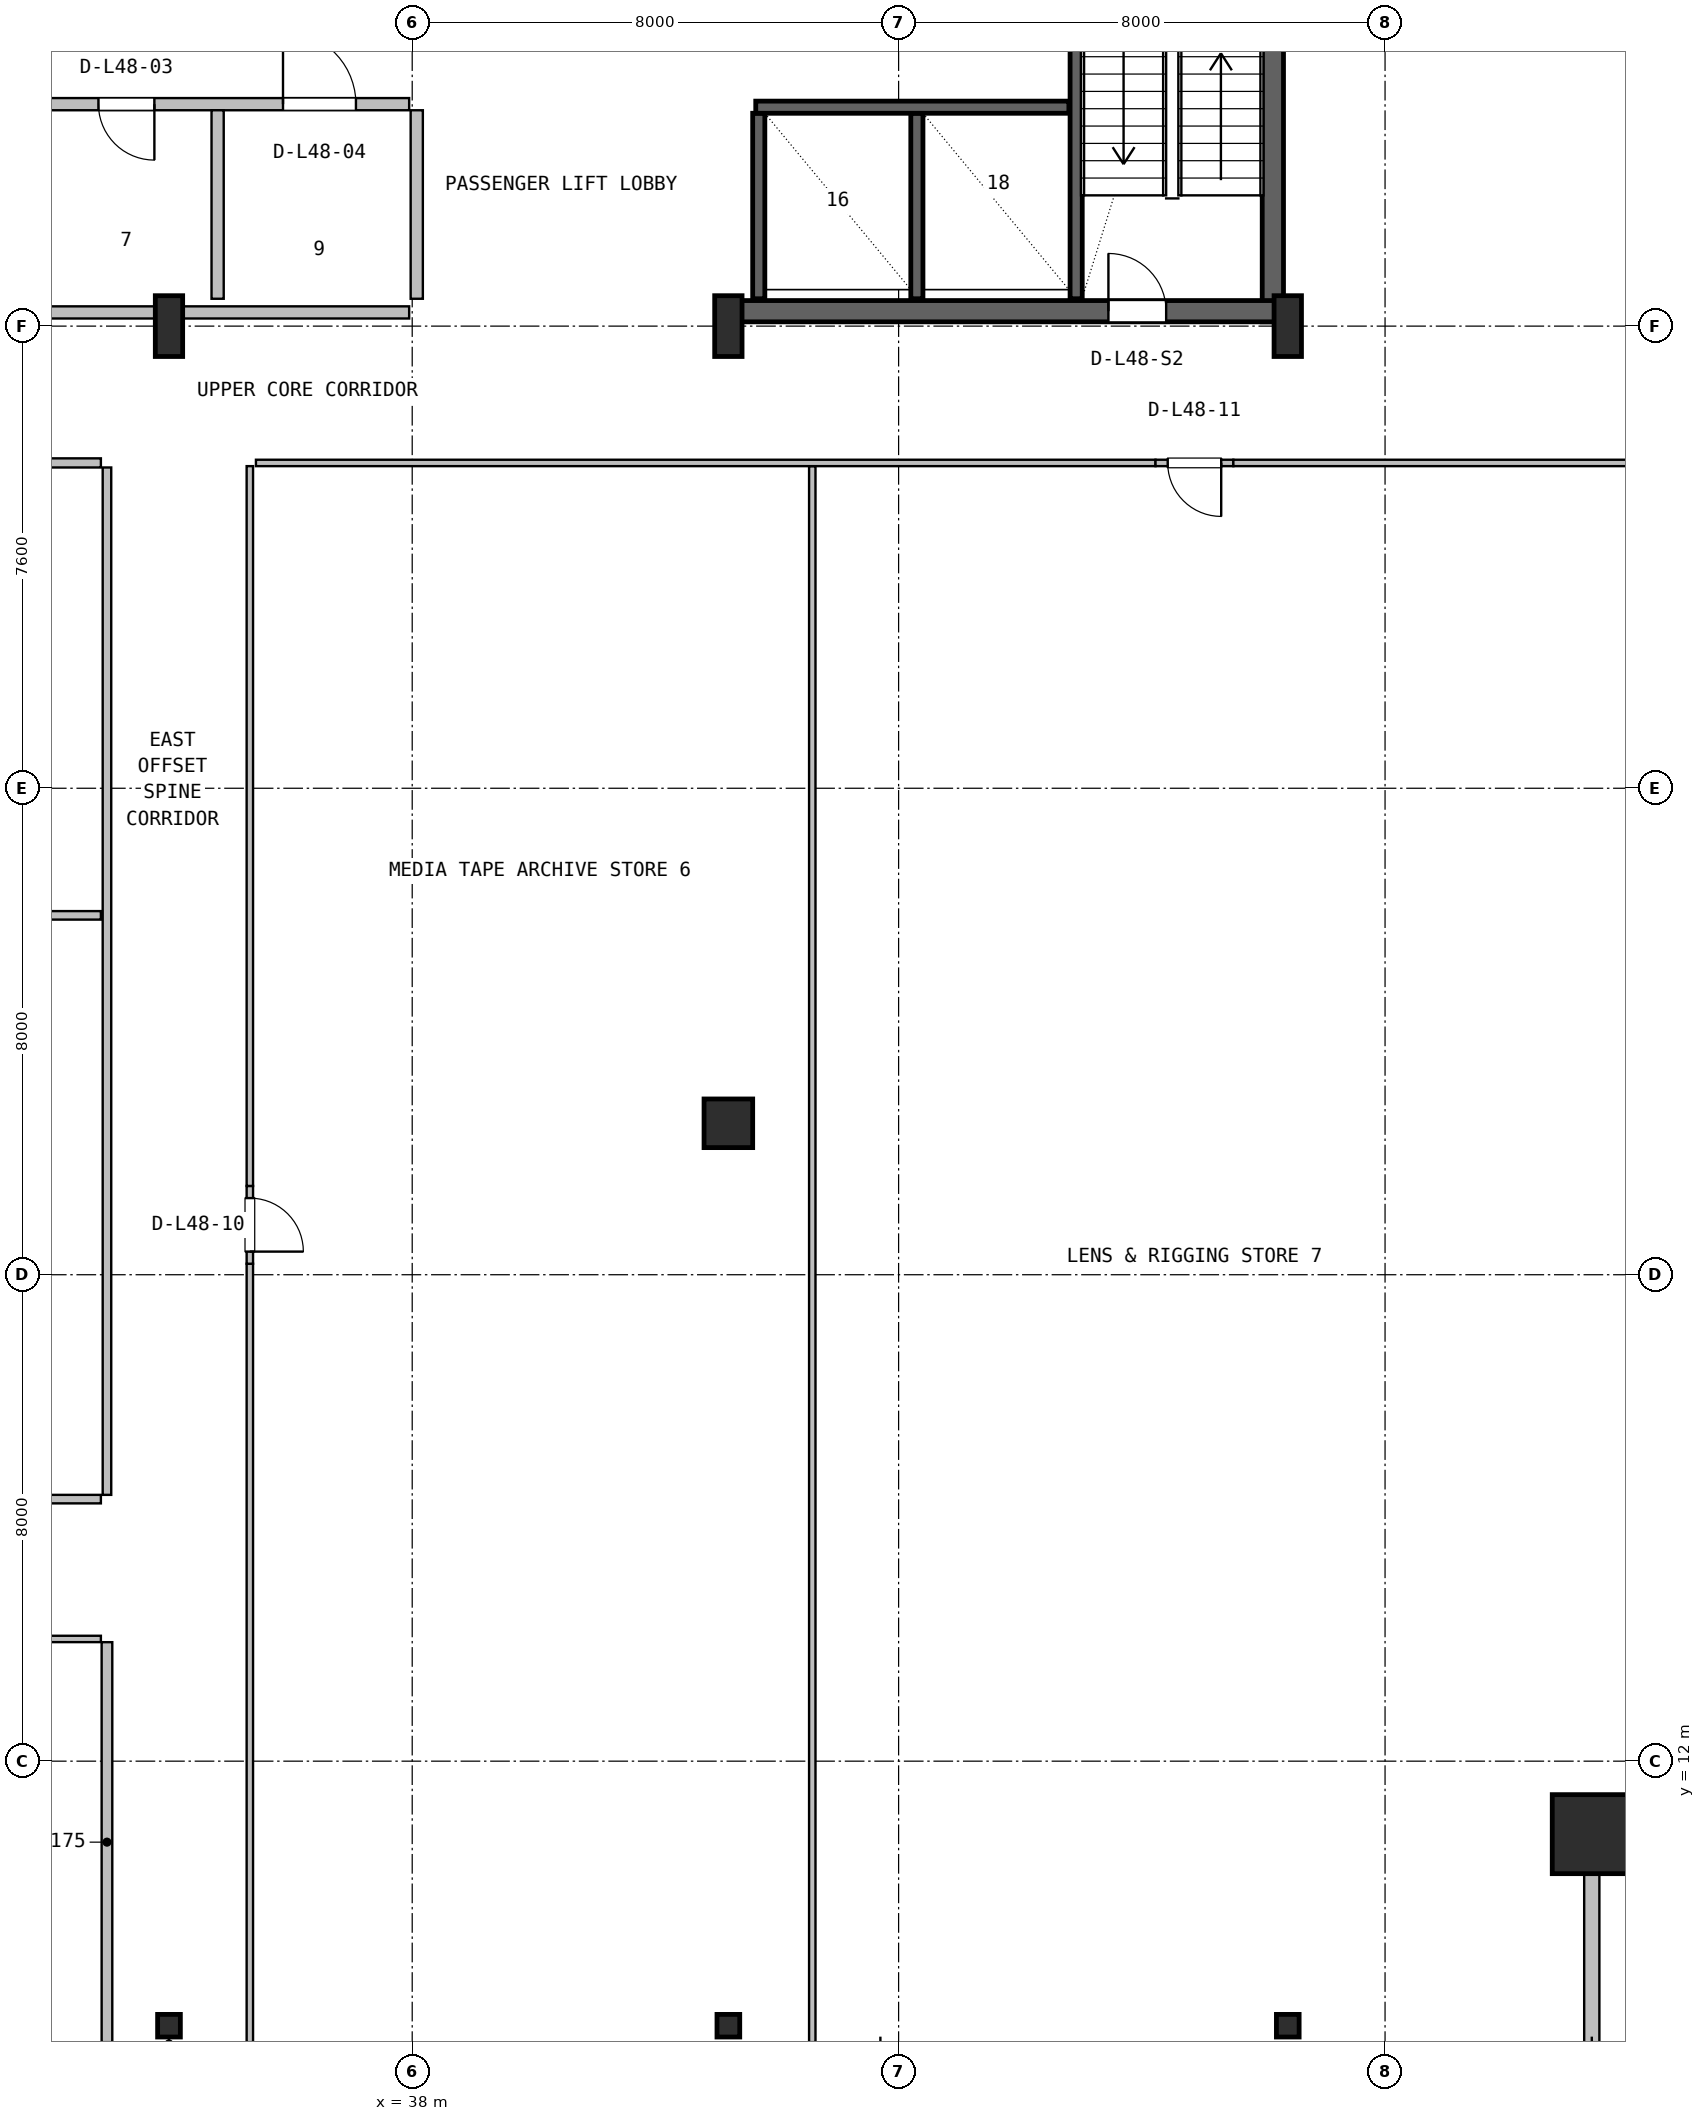
"""IFC4 building model, lengths in metres.
Left out: names, types, materials, properties, quantities, classifications, styles, units other than length and angle.
Written with IfcOpenShell. Run it as: python <this file> out.ifc"""

import sys

from ifc_helpers import new_model, si_unit, direction, frame, frame_2d, origin, origin_2d, place, context, subcontext, project, spatial, rectangle, hollow_rectangle, i_section, extrude, source, transform, mapped, element, fill, save


model = new_model("IFC4")
c1 = context("Model", 3, precision=1e-05, world=origin(), true_north=direction((0.0, 1.0)))
c2 = subcontext(c1, "Body", "Model", "MODEL_VIEW")
j1 = project(units=[si_unit("LENGTHUNIT", "METRE"), si_unit("PLANEANGLEUNIT", "RADIAN")], contexts=[c1])
p1 = place(None, origin())
s1 = spatial("IfcSite", under=j1, at=p1, CompositionType="ELEMENT")
p2 = place(p1, origin())
s2 = spatial("IfcBuilding", under=s1, at=p2, CompositionType="ELEMENT")
p3 = place(p2, frame((0.0, 0.0, 196.0)))
s3 = spatial("IfcBuildingStorey", under=s2, at=p3, CompositionType="ELEMENT", Elevation=196.0)
p4 = place(p3, frame((52.155, 35.67, 0.0), z_axis=(0.0, 0.0, 1.0), x_axis=(0.0, 1.0, 0.0)))
e1 = element("IfcWall", 1, at=p4, inside=s3, PredefinedType="SHEAR", context=c2, shape_type="SweptSolid", body=[
    extrude(rectangle(XDim=11.13, YDim=0.35, at=frame_2d((5.565, 0.0))), origin(), (0.0, 0.0, 1.0), 3.55),
])
p5 = place(p3, frame((43.2, 35.845, 0.0), z_axis=(0.0, 0.0, 1.0), x_axis=(1.0, 0.0, 0.0)))
e2 = element("IfcWall", 2, at=p5, inside=s3, PredefinedType="SHEAR", context=c2, shape_type="SweptSolid", body=[
    extrude(rectangle(XDim=9.13, YDim=0.35, at=frame_2d((4.565, 0.0))), origin(), (0.0, 0.0, 1.0), 3.55),
])
p6 = place(p5, frame((6.25, 0.0, 0.0)))
e3 = element("IfcOpeningElement", 3, at=p6, cuts=e2, PredefinedType="OPENING", context=c2, shape_type="SweptSolid", body=[
    extrude(rectangle(XDim=0.95, YDim=2.1, at=frame_2d((0.475, 1.05))), frame((0.0, 0.185, 0.0), z_axis=(0.0, -1.0, 0.0), x_axis=(1.0, 0.0, 0.0)), (0.0, 0.0, 1.0), 0.37),
])
m1 = source(origin(), c2, "Body", "SweptSolid", [
    extrude(i_section(OverallWidth=0.45, OverallDepth=1.0, WebThickness=0.016, FlangeThickness=0.03, FilletRadius=0.016, at=origin_2d()), origin(), (0.0, 0.0, 1.0), 3.8),
])
for number, where, z_axis, x_axis in (
    (4, (34.0, 35.6, 0.0), (0.0, 0.0, 1.0), (1.0, 0.0, 0.0)),
    (5, (43.2, 35.6, 0.0), (0.0, 0.0, 1.0), (1.0, 0.0, 0.0)),
    (6, (52.4, 35.6, 0.0), (0.0, 0.0, 1.0), (1.0, 0.0, 0.0)),
):
    element("IfcColumn", number, at=place(p3, frame(where, z_axis=z_axis, x_axis=x_axis)), inside=s3, PredefinedType="COLUMN", context=c2, shape_type="MappedRepresentation", body=[
        mapped(m1, transform((0.0, 0.0, 0.0), x_axis=(1.0, 0.0, 0.0), y_axis=(0.0, 1.0, 0.0), z_axis=(0.0, 0.0, 1.0), scale=1.0)),
    ])
m2 = source(origin(), c2, "Body", "SweptSolid", [
    extrude(hollow_rectangle(XDim=1.3, YDim=1.3, WallThickness=0.05, at=origin_2d()), origin(), (0.0, 0.0, 1.0), 3.8),
])
p7 = place(p3, frame((57.4, 10.8, 0.0), z_axis=(0.0, 0.0, 1.0), x_axis=(1.0, 0.0, 0.0)))
e7 = element("IfcColumn", 7, at=p7, inside=s3, PredefinedType="COLUMN", context=c2, shape_type="MappedRepresentation", body=[
    mapped(m2, transform((0.0, 0.0, 0.0), x_axis=(1.0, 0.0, 0.0), y_axis=(0.0, 1.0, 0.0), z_axis=(0.0, 0.0, 1.0), scale=1.0)),
])
m3 = source(origin(), c2, "Body", "SweptSolid", [
    extrude(i_section(OverallWidth=0.374, OverallDepth=0.372, WebThickness=0.016, FlangeThickness=0.026, FilletRadius=0.016, at=origin_2d()), origin(), (0.0, 0.0, 1.0), 3.8),
])
for number, where, z_axis, x_axis in (
    (8, (34.0, 7.65, 0.0), (0.0, 0.0, 1.0), (1.0, 0.0, 0.0)),
    (9, (43.2, 7.65, 0.0), (0.0, 0.0, 1.0), (1.0, 0.0, 0.0)),
    (10, (52.4, 7.65, 0.0), (0.0, 0.0, 1.0), (1.0, 0.0, 0.0)),
):
    element("IfcColumn", number, at=place(p3, frame(where, z_axis=z_axis, x_axis=x_axis)), inside=s3, PredefinedType="COLUMN", context=c2, shape_type="MappedRepresentation", body=[
        mapped(m3, transform((0.0, 0.0, 0.0), x_axis=(1.0, 0.0, 0.0), y_axis=(0.0, 1.0, 0.0), z_axis=(0.0, 0.0, 1.0), scale=1.0)),
    ])
m4 = source(origin(), c2, "Body", "SweptSolid", [
    extrude(rectangle(XDim=0.8, YDim=0.8, at=origin_2d()), origin(), (0.0, 0.0, 1.0), 3.8),
])
p8 = place(p3, frame((43.2, 22.49, 0.0), z_axis=(0.0, 0.0, 1.0), x_axis=(1.0, 0.0, 0.0)))
e11 = element("IfcColumn", 11, at=p8, inside=s3, PredefinedType="COLUMN", context=c2, shape_type="MappedRepresentation", body=[
    mapped(m4, transform((0.0, 0.0, 0.0), x_axis=(1.0, 0.0, 0.0), y_axis=(0.0, 1.0, 0.0), z_axis=(0.0, 0.0, 1.0), scale=1.0)),
])
p9 = place(p3, frame((57.4, 7.28, 0.0), z_axis=(0.0, 0.0, 1.0), x_axis=(0.0, 1.0, 0.0)))
e12 = element("IfcWall", 12, at=p9, inside=s3, PredefinedType="SOLIDWALL", context=c2, shape_type="SweptSolid", body=[
    extrude(rectangle(XDim=3.6, YDim=0.25, at=frame_2d((1.8, 0.0))), origin(), (0.0, 0.0, 1.0), 1.925),
])
p10 = place(p3, frame((48.92, 36.05, 0.0), z_axis=(0.0, 0.0, 1.0), x_axis=(0.0, 1.0, 0.0)))
e13 = element("IfcWall", 13, at=p10, inside=s3, PredefinedType="SHEAR", context=c2, shape_type="SweptSolid", body=[
    extrude(rectangle(XDim=10.5, YDim=0.2, at=frame_2d((5.25, 0.0))), origin(), (0.0, 0.0, 1.0), 3.55),
])
for number, where, z_axis, x_axis in (
    (14, (43.7, 36.05, 0.0), (0.0, 0.0, 1.0), (0.0, 1.0, 0.0)),
    (15, (46.3, 36.05, 0.0), (0.0, 0.0, 1.0), (0.0, 1.0, 0.0)),
):
    element("IfcWall", number, at=place(p3, frame(where, z_axis=z_axis, x_axis=x_axis)), inside=s3, PredefinedType="SHEAR", context=c2, shape_type="SweptSolid", body=[
        extrude(rectangle(XDim=3.05, YDim=0.2, at=frame_2d((1.525, 0.0))), origin(), (0.0, 0.0, 1.0), 3.55),
    ])
p11 = place(p3, frame((43.65, 39.2, 0.0), z_axis=(0.0, 0.0, 1.0), x_axis=(1.0, 0.0, 0.0)))
e16 = element("IfcWall", 16, at=p11, inside=s3, PredefinedType="SHEAR", context=c2, shape_type="SweptSolid", body=[
    extrude(rectangle(XDim=5.15, YDim=0.2, at=frame_2d((2.575, 0.0))), origin(), (0.0, 0.0, 1.0), 3.55),
])
p12 = place(p3, frame((25.0, 35.825, 0.0), z_axis=(0.0, 0.0, 1.0), x_axis=(1.0, 0.0, 0.0)))
e17 = element("IfcWall", 17, at=p12, inside=s3, PredefinedType="SOLIDWALL", context=c2, shape_type="SweptSolid", body=[
    extrude(rectangle(XDim=12.95, YDim=0.2, at=frame_2d((6.475, 0.0))), origin(), (0.0, 0.0, 1.0), 2.575),
])
p13 = place(p3, frame((25.0, 39.25, 0.0), z_axis=(0.0, 0.0, 1.0), x_axis=(1.0, 0.0, 0.0)))
e18 = element("IfcWall", 18, at=p13, inside=s3, PredefinedType="SOLIDWALL", context=c2, shape_type="SweptSolid", body=[
    extrude(rectangle(XDim=12.95, YDim=0.2, at=frame_2d((6.475, 0.0))), origin(), (0.0, 0.0, 1.0), 3.53),
])
p14 = place(p13, frame((1.1, 0.0, 0.0)))
e19 = element("IfcOpeningElement", 19, at=p14, cuts=e18, PredefinedType="OPENING", context=c2, shape_type="SweptSolid", body=[
    extrude(rectangle(XDim=0.9, YDim=2.06, at=frame_2d((0.45, 1.03))), frame((0.0, 0.11, 0.0), z_axis=(0.0, -1.0, 0.0), x_axis=(1.0, 0.0, 0.0)), (0.0, 0.0, 1.0), 0.22),
])
p15 = place(p13, frame((4.5, 0.0, 0.0)))
e20 = element("IfcOpeningElement", 20, at=p15, cuts=e18, PredefinedType="OPENING", context=c2, shape_type="SweptSolid", body=[
    extrude(rectangle(XDim=0.9, YDim=2.06, at=frame_2d((0.45, 1.03))), frame((0.0, 0.11, 0.0), z_axis=(0.0, -1.0, 0.0), x_axis=(1.0, 0.0, 0.0)), (0.0, 0.0, 1.0), 0.22),
])
p16 = place(p13, frame((7.84, 0.0, 0.0)))
e21 = element("IfcOpeningElement", 21, at=p16, cuts=e18, PredefinedType="OPENING", context=c2, shape_type="SweptSolid", body=[
    extrude(rectangle(XDim=0.92, YDim=2.08, at=frame_2d((0.46, 1.04))), frame((0.0, 0.11, 0.0), z_axis=(0.0, -1.0, 0.0), x_axis=(1.0, 0.0, 0.0)), (0.0, 0.0, 1.0), 0.22),
])
p17 = place(p13, frame((10.875, 0.0, 0.0)))
e22 = element("IfcOpeningElement", 22, at=p17, cuts=e18, PredefinedType="OPENING", context=c2, shape_type="SweptSolid", body=[
    extrude(rectangle(XDim=1.2, YDim=2.1, at=frame_2d((0.6, 1.05))), frame((0.0, 0.11, 0.0), z_axis=(0.0, -1.0, 0.0), x_axis=(1.0, 0.0, 0.0)), (0.0, 0.0, 1.0), 0.22),
])
for number, where, z_axis, x_axis in (
    (23, (34.8, 36.05, 0.0), (0.0, 0.0, 1.0), (0.0, 1.0, 0.0)),
    (24, (38.075, 36.05, 0.0), (0.0, 0.0, 1.0), (0.0, 1.0, 0.0)),
):
    element("IfcWall", number, at=place(p3, frame(where, z_axis=z_axis, x_axis=x_axis)), inside=s3, PredefinedType="SOLIDWALL", context=c2, shape_type="SweptSolid", body=[
        extrude(rectangle(XDim=3.1, YDim=0.2, at=frame_2d((1.55, 0.0))), origin(), (0.0, 0.0, 1.0), 3.53),
    ])
p18 = place(p3, frame((29.015, 14.01, 0.0), z_axis=(0.0, 0.0, 1.0), x_axis=(1.0, 0.0, 0.0)))
e25 = element("IfcWall", 25, at=p18, inside=s3, PredefinedType="PARTITIONING", context=c2, shape_type="SweptSolid", body=[
    extrude(rectangle(XDim=3.865, YDim=0.105, at=frame_2d((1.933, 0.0))), origin(), (0.0, 0.0, 1.0), 3.53),
])
p19 = place(p3, frame((32.98, 7.38, 0.0), z_axis=(0.0, 0.0, 1.0), x_axis=(0.0, 1.0, 0.0)))
e26 = element("IfcWall", 26, at=p19, inside=s3, PredefinedType="PARTITIONING", context=c2, shape_type="SweptSolid", body=[
    extrude(rectangle(XDim=6.577, YDim=0.175, at=frame_2d((3.289, 0.0))), origin(), (0.0, 0.0, 1.0), 1.925),
])
p20 = place(p3, frame((22.665, 16.31, 0.0), z_axis=(0.0, 0.0, 1.0), x_axis=(1.0, 0.0, 0.0)))
e27 = element("IfcWall", 27, at=p20, inside=s3, PredefinedType="PARTITIONING", context=c2, shape_type="SweptSolid", body=[
    extrude(rectangle(XDim=10.215, YDim=0.14, at=frame_2d((5.107, 0.0))), origin(), (0.0, 0.0, 1.0), 1.925),
])
p21 = place(p3, frame((32.98, 16.38, 0.0), z_axis=(0.0, 0.0, 1.0), x_axis=(0.0, 1.0, 0.0)))
e28 = element("IfcWall", 28, at=p21, inside=s3, PredefinedType="PARTITIONING", context=c2, shape_type="SweptSolid", body=[
    extrude(rectangle(XDim=16.895, YDim=0.14, at=frame_2d((8.448, 0.0))), origin(), (0.0, 0.0, 1.0), 1.925),
])
p22 = place(p3, frame((7.18, 25.91, 0.0), z_axis=(0.0, 0.0, 1.0), x_axis=(1.0, 0.0, 0.0)))
e29 = element("IfcWall", 29, at=p22, inside=s3, PredefinedType="PARTITIONING", context=c2, shape_type="SweptSolid", body=[
    extrude(rectangle(XDim=25.7, YDim=0.14, at=frame_2d((12.85, 0.0))), origin(), (0.0, 0.0, 1.0), 1.925),
])
p23 = place(p3, frame((22.605, 33.35, 0.0), z_axis=(0.0, 0.0, 1.0), x_axis=(1.0, 0.0, 0.0)))
e30 = element("IfcWall", 30, at=p23, inside=s3, PredefinedType="PARTITIONING", context=c2, shape_type="SweptSolid", body=[
    extrude(rectangle(XDim=10.275, YDim=0.15, at=frame_2d((5.137, 0.0))), origin(), (0.0, 0.0, 1.0), 2.195),
])
p24 = place(p3, frame((44.58, 7.38, 0.0), z_axis=(0.0, 0.0, 1.0), x_axis=(0.0, 1.0, 0.0)))
e31 = element("IfcWall", 31, at=p24, inside=s3, PredefinedType="PARTITIONING", context=c2, shape_type="SweptSolid", body=[
    extrude(rectangle(XDim=25.917, YDim=0.105, at=frame_2d((12.958, 0.0))), origin(), (0.0, 0.0, 1.0), 1.925),
])
p25 = place(p3, frame((35.43, 33.35, 0.0), z_axis=(0.0, 0.0, 1.0), x_axis=(1.0, 0.0, 0.0)))
e32 = element("IfcWall", 32, at=p25, inside=s3, PredefinedType="PARTITIONING", context=c2, shape_type="SweptSolid", body=[
    extrude(rectangle(XDim=14.795, YDim=0.105, at=frame_2d((7.397, 0.0))), origin(), (0.0, 0.0, 1.0), 2.195),
])
p26 = place(p3, frame((50.225, 33.35, 0.0), z_axis=(0.0, 0.0, 1.0), x_axis=(1.0, 0.0, 0.0)))
e33 = element("IfcWall", 33, at=p26, inside=s3, PredefinedType="PARTITIONING", context=c2, shape_type="SweptSolid", body=[
    extrude(rectangle(XDim=1.28, YDim=0.105, at=frame_2d((0.64, 0.0))), origin(), (0.0, 0.0, 1.0), 2.195),
])
p27 = place(p26, frame((0.2, 0.0, 0.0)))
e34 = element("IfcOpeningElement", 34, at=p27, cuts=e33, PredefinedType="OPENING", context=c2, shape_type="SweptSolid", body=[
    extrude(rectangle(XDim=0.88, YDim=2.06, at=frame_2d((0.44, 1.03))), frame((0.0, 0.062, 0.0), z_axis=(0.0, -1.0, 0.0), x_axis=(1.0, 0.0, 0.0)), (0.0, 0.0, 1.0), 0.125),
])
p28 = place(p3, frame((51.505, 33.35, 0.0), z_axis=(0.0, 0.0, 1.0), x_axis=(1.0, 0.0, 0.0)))
e35 = element("IfcWall", 35, at=p28, inside=s3, PredefinedType="PARTITIONING", context=c2, shape_type="SweptSolid", body=[
    extrude(rectangle(XDim=9.315, YDim=0.105, at=frame_2d((4.658, 0.0))), origin(), (0.0, 0.0, 1.0), 1.925),
])
p29 = place(p3, frame((35.33, 7.38, 0.0), z_axis=(0.0, 0.0, 1.0), x_axis=(0.0, 1.0, 0.0)))
e36 = element("IfcWall", 36, at=p29, inside=s3, PredefinedType="PARTITIONING", context=c2, shape_type="SweptSolid", body=[
    extrude(rectangle(XDim=12.8, YDim=0.105, at=frame_2d((6.4, 0.0))), origin(), (0.0, 0.0, 1.0), 1.925),
])
p30 = place(p3, frame((35.33, 20.18, 0.0), z_axis=(0.0, 0.0, 1.0), x_axis=(0.0, 1.0, 0.0)))
e37 = element("IfcWall", 37, at=p30, inside=s3, PredefinedType="PARTITIONING", context=c2, shape_type="SweptSolid", body=[
    extrude(rectangle(XDim=1.28, YDim=0.105, at=frame_2d((0.64, 0.0))), origin(), (0.0, 0.0, 1.0), 3.222),
])
p31 = place(p30, frame((0.2, 0.0, 0.0)))
e38 = element("IfcOpeningElement", 38, at=p31, cuts=e37, PredefinedType="OPENING", context=c2, shape_type="SweptSolid", body=[
    extrude(rectangle(XDim=0.88, YDim=2.06, at=frame_2d((0.44, 1.03))), frame((0.0, 0.062, 0.0), z_axis=(0.0, -1.0, 0.0), x_axis=(1.0, 0.0, 0.0)), (0.0, 0.0, 1.0), 0.125),
])
p32 = place(p3, frame((35.33, 21.46, 0.0), z_axis=(0.0, 0.0, 1.0), x_axis=(0.0, 1.0, 0.0)))
e39 = element("IfcWall", 39, at=p32, inside=s3, PredefinedType="PARTITIONING", context=c2, shape_type="SweptSolid", body=[
    extrude(rectangle(XDim=11.837, YDim=0.105, at=frame_2d((5.918, 0.0))), origin(), (0.0, 0.0, 1.0), 1.925),
])
m5 = source(origin(), c2, "Body", "SweptSolid", [
    extrude(rectangle(XDim=0.95, YDim=2.1, at=frame_2d((0.475, 1.05))), frame((0.0, 0.025, 0.0), z_axis=(0.0, -1.0, 0.0), x_axis=(1.0, 0.0, 0.0)), (0.0, 0.0, 1.0), 0.05),
])
p33 = place(p6, origin())
e40 = element("IfcDoor", 40, at=p33, inside=s3, OperationType="SINGLE_SWING_LEFT", PredefinedType="DOOR", context=c2, shape_type="MappedRepresentation", body=[
    mapped(m5, transform((0.0, 0.0, 0.0), x_axis=(1.0, 0.0, 0.0), y_axis=(0.0, 1.0, 0.0), z_axis=(0.0, 0.0, 1.0), scale=1.0)),
])
fill(e3, e40)
m6 = source(origin(), c2, "Body", "SweptSolid", [
    extrude(rectangle(XDim=0.92, YDim=2.08, at=frame_2d((0.46, 1.04))), frame((0.0, 0.025, 0.0), z_axis=(0.0, -1.0, 0.0), x_axis=(1.0, 0.0, 0.0)), (0.0, 0.0, 1.0), 0.05),
])
p34 = place(p16, frame((0.92, 0.0, 0.0), z_axis=(0.0, 0.0, 1.0), x_axis=(-1.0, 0.0, 0.0)))
e41 = element("IfcDoor", 41, at=p34, inside=s3, OperationType="SINGLE_SWING_RIGHT", PredefinedType="DOOR", context=c2, shape_type="MappedRepresentation", body=[
    mapped(m6, transform((0.0, 0.0, 0.0), x_axis=(1.0, 0.0, 0.0), y_axis=(0.0, 1.0, 0.0), z_axis=(0.0, 0.0, 1.0), scale=1.0)),
])
fill(e21, e41)
m7 = source(origin(), c2, "Body", "SweptSolid", [
    extrude(rectangle(XDim=1.2, YDim=2.1, at=frame_2d((0.6, 1.05))), frame((0.0, 0.025, 0.0), z_axis=(0.0, -1.0, 0.0), x_axis=(1.0, 0.0, 0.0)), (0.0, 0.0, 1.0), 0.05),
])
p35 = place(p17, origin())
e42 = element("IfcDoor", 42, at=p35, inside=s3, OperationType="SINGLE_SWING_LEFT", PredefinedType="DOOR", context=c2, shape_type="MappedRepresentation", body=[
    mapped(m7, transform((0.0, 0.0, 0.0), x_axis=(1.0, 0.0, 0.0), y_axis=(0.0, 1.0, 0.0), z_axis=(0.0, 0.0, 1.0), scale=1.0)),
])
fill(e22, e42)
m8 = source(origin(), c2, "Body", "SweptSolid", [
    extrude(rectangle(XDim=0.88, YDim=2.06, at=frame_2d((0.44, 1.03))), frame((0.0, 0.025, 0.0), z_axis=(0.0, -1.0, 0.0), x_axis=(1.0, 0.0, 0.0)), (0.0, 0.0, 1.0), 0.05),
])
p36 = place(p31, frame((0.88, 0.0, 0.0), z_axis=(0.0, 0.0, 1.0), x_axis=(-1.0, 0.0, 0.0)))
e43 = element("IfcDoor", 43, at=p36, inside=s3, OperationType="SINGLE_SWING_LEFT", PredefinedType="DOOR", context=c2, shape_type="MappedRepresentation", body=[
    mapped(m8, transform((0.0, 0.0, 0.0), x_axis=(1.0, 0.0, 0.0), y_axis=(0.0, 1.0, 0.0), z_axis=(0.0, 0.0, 1.0), scale=1.0)),
])
fill(e38, e43)
p37 = place(p27, frame((0.88, 0.0, 0.0), z_axis=(0.0, 0.0, 1.0), x_axis=(-1.0, 0.0, 0.0)))
e44 = element("IfcDoor", 44, at=p37, inside=s3, OperationType="SINGLE_SWING_RIGHT", PredefinedType="DOOR", context=c2, shape_type="MappedRepresentation", body=[
    mapped(m8, transform((0.0, 0.0, 0.0), x_axis=(1.0, 0.0, 0.0), y_axis=(0.0, 1.0, 0.0), z_axis=(0.0, 0.0, 1.0), scale=1.0)),
])
fill(e34, e44)
save(model, sys.argv[1])
